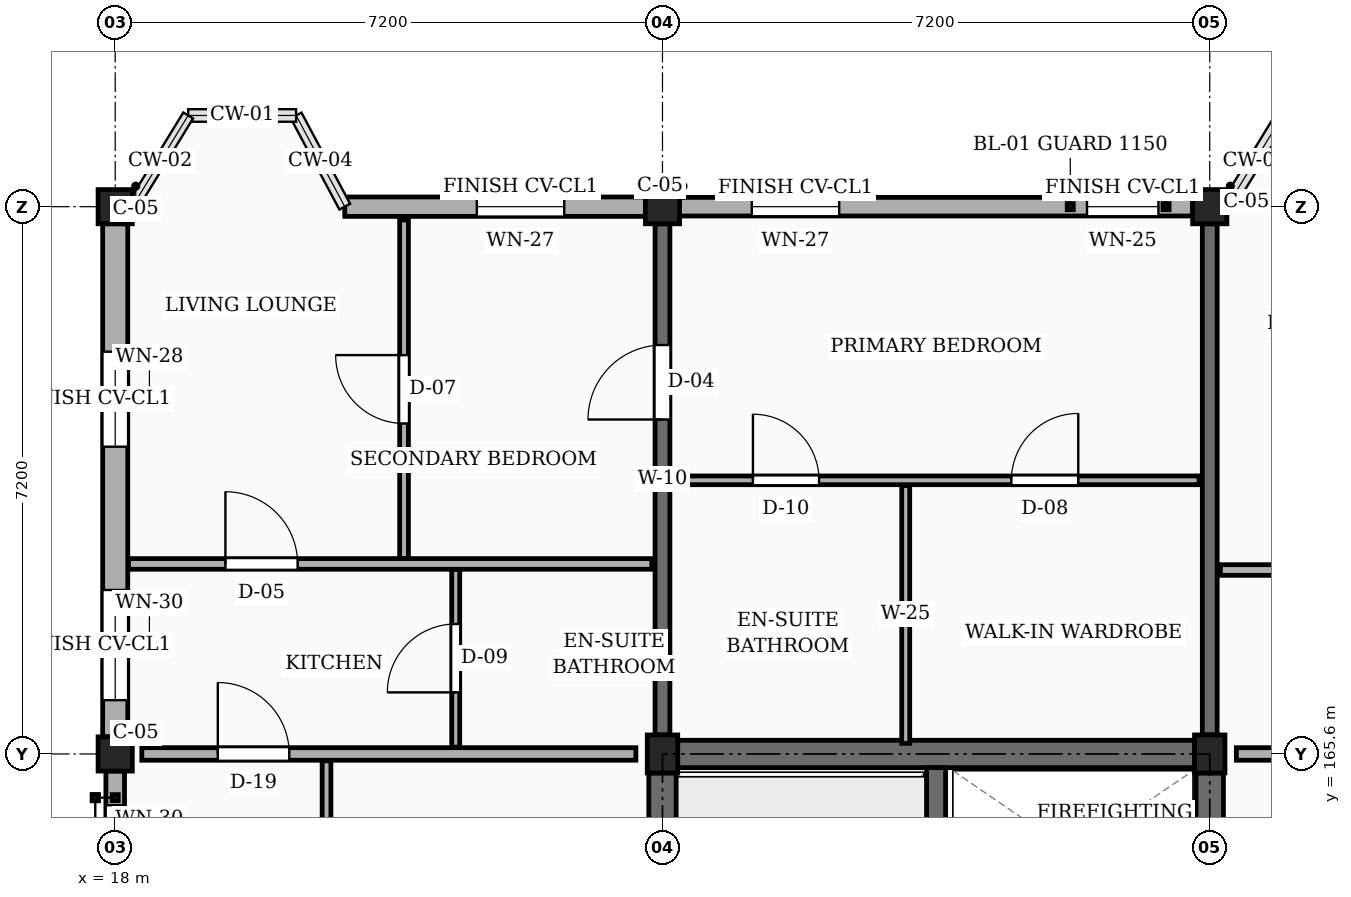
"""IFC4 building model, lengths in metres.
Left out: names, types, materials, properties, quantities, classifications, styles, units other than length and angle.
Written with IfcOpenShell. Run it as: python <this file> out.ifc"""

import sys

from ifc_helpers import new_model, si_unit, direction, frame, frame_2d, origin, origin_2d, place, context, subcontext, project, spatial, rectangle, extrude, element, fill, save


model = new_model("IFC4")
c1 = context("Model", 3, precision=1e-05, world=origin(), true_north=direction((0.0, 1.0)))
c2 = subcontext(c1, "Body", "Model", "MODEL_VIEW")
j1 = project(units=[si_unit("LENGTHUNIT", "METRE"), si_unit("PLANEANGLEUNIT", "RADIAN")], contexts=[c1])
p1 = place(None, origin())
s1 = spatial("IfcSite", under=j1, at=p1, CompositionType="ELEMENT")
p2 = place(p1, origin())
s2 = spatial("IfcBuilding", under=s1, at=p2, CompositionType="ELEMENT")
p3 = place(p2, frame((0.0, 0.0, 39.15)))
s3 = spatial("IfcBuildingStorey", under=s2, at=p3, CompositionType="ELEMENT", Elevation=39.15)
for number, where, z_axis, x_axis in (
    (1, (18.0, 165.6, 0.0), (0.0, 0.0, 1.0), (1.0, 0.0, 0.0)),
    (2, (18.0, 172.8, 0.0), (0.0, 0.0, 1.0), (1.0, 0.0, 0.0)),
):
    element("IfcColumn", number, at=place(p3, frame(where, z_axis=z_axis, x_axis=x_axis)), inside=s3, PredefinedType="COLUMN", context=c2, shape_type="SweptSolid", body=[
        extrude(rectangle(XDim=0.45, YDim=0.45, at=origin_2d()), origin(), (0.0, 0.0, 1.0), 3.15),
    ])
p4 = place(p3, frame((25.2, 165.6, 0.0), z_axis=(0.0, 0.0, 1.0), x_axis=(1.0, 0.0, 0.0)))
e3 = element("IfcColumn", 3, at=p4, inside=s3, PredefinedType="COLUMN", context=c2, shape_type="SweptSolid", body=[
    extrude(rectangle(XDim=0.4, YDim=0.5, at=origin_2d()), origin(), (0.0, 0.0, 1.0), 3.15),
])
p5 = place(p3, frame((25.2, 172.8, 0.0), z_axis=(0.0, 0.0, 1.0), x_axis=(1.0, 0.0, 0.0)))
e4 = element("IfcColumn", 4, at=p5, inside=s3, PredefinedType="COLUMN", context=c2, shape_type="SweptSolid", body=[
    extrude(rectangle(XDim=0.45, YDim=0.45, at=origin_2d()), origin(), (0.0, 0.0, 1.0), 3.15),
])
p6 = place(p3, frame((32.4, 165.6, 0.0), z_axis=(0.0, 0.0, 1.0), x_axis=(1.0, 0.0, 0.0)))
e5 = element("IfcColumn", 5, at=p6, inside=s3, PredefinedType="COLUMN", context=c2, shape_type="SweptSolid", body=[
    extrude(rectangle(XDim=0.4, YDim=0.5, at=origin_2d()), origin(), (0.0, 0.0, 1.0), 3.15),
])
p7 = place(p3, frame((32.4, 172.8, 0.0), z_axis=(0.0, 0.0, 1.0), x_axis=(1.0, 0.0, 0.0)))
e6 = element("IfcColumn", 6, at=p7, inside=s3, PredefinedType="COLUMN", context=c2, shape_type="SweptSolid", body=[
    extrude(rectangle(XDim=0.45, YDim=0.45, at=origin_2d()), origin(), (0.0, 0.0, 1.0), 3.15),
])
p8 = place(p3, frame((25.2, 165.85, 0.0), z_axis=(0.0, 0.0, 1.0), x_axis=(0.0, 1.0, 0.0)))
e7 = element("IfcWall", 7, at=p8, inside=s3, PredefinedType="SOLIDWALL", context=c2, shape_type="SweptSolid", body=[
    extrude(rectangle(XDim=6.725, YDim=0.195, at=frame_2d((3.362, 0.0))), origin(), (0.0, 0.0, 1.0), 2.185),
])
p9 = place(p8, frame((4.15, 0.0, 0.0)))
e8 = element("IfcOpeningElement", 8, at=p9, cuts=e7, PredefinedType="OPENING", context=c2, shape_type="SweptSolid", body=[
    extrude(rectangle(XDim=0.98, YDim=2.12, at=frame_2d((0.49, 1.06))), frame((0.0, 0.107, 0.0), z_axis=(0.0, -1.0, 0.0), x_axis=(1.0, 0.0, 0.0)), (0.0, 0.0, 1.0), 0.215),
])
p10 = place(p3, frame((32.4, 165.85, 0.0), z_axis=(0.0, 0.0, 1.0), x_axis=(0.0, 1.0, 0.0)))
e9 = element("IfcWall", 9, at=p10, inside=s3, PredefinedType="SOLIDWALL", context=c2, shape_type="SweptSolid", body=[
    extrude(rectangle(XDim=6.725, YDim=0.195, at=frame_2d((3.362, 0.0))), origin(), (0.0, 0.0, 1.0), 2.185),
])
p11 = place(p3, frame((32.175, 172.8, 0.0), z_axis=(0.0, 0.0, 1.0), x_axis=(-1.0, 0.0, 0.0)))
e10 = element("IfcWall", 10, at=p11, inside=s3, PredefinedType="SOLIDWALL", context=c2, shape_type="SweptSolid", body=[
    extrude(rectangle(XDim=6.75, YDim=0.245, at=frame_2d((3.375, 0.0))), origin(), (0.0, 0.0, 1.0), 2.455),
])
p12 = place(p11, frame((0.45, 0.0, 0.78)))
e11 = element("IfcOpeningElement", 11, at=p12, cuts=e10, PredefinedType="OPENING", context=c2, shape_type="SweptSolid", body=[
    extrude(rectangle(XDim=0.94, YDim=1.44, at=frame_2d((0.47, 0.72))), frame((0.0, 0.133, 0.0), z_axis=(0.0, -1.0, 0.0), x_axis=(1.0, 0.0, 0.0)), (0.0, 0.0, 1.0), 0.265),
])
p13 = place(p11, frame((4.65, 0.0, 0.78)))
e12 = element("IfcOpeningElement", 12, at=p13, cuts=e10, PredefinedType="OPENING", context=c2, shape_type="SweptSolid", body=[
    extrude(rectangle(XDim=1.15, YDim=1.44, at=frame_2d((0.575, 0.72))), frame((0.0, 0.133, 0.0), z_axis=(0.0, -1.0, 0.0), x_axis=(1.0, 0.0, 0.0)), (0.0, 0.0, 1.0), 0.265),
])
p14 = place(p3, frame((24.975, 172.8, 0.0), z_axis=(0.0, 0.0, 1.0), x_axis=(-1.0, 0.0, 0.0)))
e13 = element("IfcWall", 13, at=p14, inside=s3, PredefinedType="SOLIDWALL", context=c2, shape_type="SweptSolid", body=[
    extrude(rectangle(XDim=3.955, YDim=0.255, at=frame_2d((1.978, 0.0))), origin(), (0.0, 0.0, 1.0), 2.455),
])
p15 = place(p14, frame((1.067, 0.0, 0.78)))
e14 = element("IfcOpeningElement", 14, at=p15, cuts=e13, PredefinedType="OPENING", context=c2, shape_type="SweptSolid", body=[
    extrude(rectangle(XDim=1.15, YDim=1.44, at=frame_2d((0.575, 0.72))), frame((0.0, 0.137, 0.0), z_axis=(0.0, -1.0, 0.0), x_axis=(1.0, 0.0, 0.0)), (0.0, 0.0, 1.0), 0.275),
])
p16 = place(p3, frame((18.0, 172.575, 0.0), z_axis=(0.0, 0.0, 1.0), x_axis=(0.0, -1.0, 0.0)))
e15 = element("IfcWall", 15, at=p16, inside=s3, PredefinedType="SOLIDWALL", context=c2, shape_type="SweptSolid", body=[
    extrude(rectangle(XDim=6.75, YDim=0.33, at=frame_2d((3.375, 0.0))), origin(), (0.0, 0.0, 1.0), 2.455),
])
p17 = place(p16, frame((1.683, 0.0, 0.78)))
e16 = element("IfcOpeningElement", 16, at=p17, cuts=e15, PredefinedType="OPENING", context=c2, shape_type="SweptSolid", body=[
    extrude(rectangle(XDim=1.25, YDim=1.44, at=frame_2d((0.625, 0.72))), frame((0.0, 0.175, 0.0), z_axis=(0.0, -1.0, 0.0), x_axis=(1.0, 0.0, 0.0)), (0.0, 0.0, 1.0), 0.35),
])
p18 = place(p16, frame((4.817, 0.0, 0.78)))
e17 = element("IfcOpeningElement", 17, at=p18, cuts=e15, PredefinedType="OPENING", context=c2, shape_type="SweptSolid", body=[
    extrude(rectangle(XDim=1.45, YDim=1.44, at=frame_2d((0.725, 0.72))), frame((0.0, 0.175, 0.0), z_axis=(0.0, -1.0, 0.0), x_axis=(1.0, 0.0, 0.0)), (0.0, 0.0, 1.0), 0.35),
])
p19 = place(p3, frame((18.0, 165.375, 0.0), z_axis=(0.0, 0.0, 1.0), x_axis=(0.0, -1.0, 0.0)))
e18 = element("IfcWall", 18, at=p19, inside=s3, PredefinedType="SOLIDWALL", context=c2, shape_type="SweptSolid", body=[
    extrude(rectangle(XDim=6.75, YDim=0.245, at=frame_2d((3.375, 0.0))), origin(), (0.0, 0.0, 1.0), 2.455),
])
p20 = place(p19, frame((0.45, 0.0, 0.78)))
e19 = element("IfcOpeningElement", 19, at=p20, cuts=e18, PredefinedType="OPENING", context=c2, shape_type="SweptSolid", body=[
    extrude(rectangle(XDim=1.45, YDim=1.44, at=frame_2d((0.725, 0.72))), frame((0.0, 0.133, 0.0), z_axis=(0.0, -1.0, 0.0), x_axis=(1.0, 0.0, 0.0)), (0.0, 0.0, 1.0), 0.265),
])
p21 = place(p19, frame((4.65, 0.0, 0.78)))
e20 = element("IfcOpeningElement", 20, at=p21, cuts=e18, PredefinedType="OPENING", context=c2, shape_type="SweptSolid", body=[
    extrude(rectangle(XDim=0.92, YDim=1.15, at=frame_2d((0.46, 0.575))), frame((0.0, 0.133, 0.0), z_axis=(0.0, -1.0, 0.0), x_axis=(1.0, 0.0, 0.0)), (0.0, 0.0, 1.0), 0.265),
])
p22 = place(p3, frame((25.2, 158.65, 0.0), z_axis=(0.0, 0.0, 1.0), x_axis=(0.0, 1.0, 0.0)))
e21 = element("IfcWall", 21, at=p22, inside=s3, PredefinedType="SHEAR", context=c2, shape_type="SweptSolid", body=[
    extrude(rectangle(XDim=6.7, YDim=0.36, at=frame_2d((3.35, 0.0))), origin(), (0.0, 0.0, 1.0), 2.885),
])
p23 = place(p3, frame((25.4, 165.6, 0.0), z_axis=(0.0, 0.0, 1.0), x_axis=(1.0, 0.0, 0.0)))
e22 = element("IfcWall", 22, at=p23, inside=s3, PredefinedType="SHEAR", context=c2, shape_type="SweptSolid", body=[
    extrude(rectangle(XDim=6.8, YDim=0.36, at=frame_2d((3.4, 0.0))), origin(), (0.0, 0.0, 1.0), 2.885),
])
p24 = place(p3, frame((32.4, 158.65, 0.0), z_axis=(0.0, 0.0, 1.0), x_axis=(0.0, 1.0, 0.0)))
e23 = element("IfcWall", 23, at=p24, inside=s3, PredefinedType="SHEAR", context=c2, shape_type="SweptSolid", body=[
    extrude(rectangle(XDim=6.7, YDim=0.36, at=frame_2d((3.35, 0.0))), origin(), (0.0, 0.0, 1.0), 2.885),
])
p25 = place(p3, frame((28.8, 158.58, 0.0), z_axis=(0.0, 0.0, 1.0), x_axis=(0.0, 1.0, 0.0)))
e24 = element("IfcWall", 24, at=p25, inside=s3, PredefinedType="SHEAR", context=c2, shape_type="SweptSolid", body=[
    extrude(rectangle(XDim=6.84, YDim=0.25, at=frame_2d((3.42, 0.0))), origin(), (0.0, 0.0, 1.0), 2.885),
])
p26 = place(p25, frame((0.42, 0.0, 0.0)))
e25 = element("IfcOpeningElement", 25, at=p26, cuts=e24, PredefinedType="OPENING", context=c2, shape_type="SweptSolid", body=[
    extrude(rectangle(XDim=1.05, YDim=2.15, at=frame_2d((0.525, 1.075))), frame((0.0, 0.135, 0.0), z_axis=(0.0, -1.0, 0.0), x_axis=(1.0, 0.0, 0.0)), (0.0, 0.0, 1.0), 0.27),
])
p27 = place(p3, frame((18.35, 165.6, 0.0), z_axis=(0.0, 0.0, 1.0), x_axis=(1.0, 0.0, 0.0)))
e26 = element("IfcWall", 26, at=p27, inside=s3, PredefinedType="PARTITIONING", context=c2, shape_type="SweptSolid", body=[
    extrude(rectangle(XDim=6.5, YDim=0.165, at=frame_2d((3.25, 0.0))), origin(), (0.0, 0.0, 1.0), 2.32),
])
p28 = place(p27, frame((1.0, 0.0, 0.0)))
e27 = element("IfcOpeningElement", 27, at=p28, cuts=e26, PredefinedType="OPENING", context=c2, shape_type="SweptSolid", body=[
    extrude(rectangle(XDim=0.94, YDim=2.12, at=frame_2d((0.47, 1.06))), frame((0.0, 0.093, 0.0), z_axis=(0.0, -1.0, 0.0), x_axis=(1.0, 0.0, 0.0)), (0.0, 0.0, 1.0), 0.185),
])
p29 = place(p3, frame((32.75, 165.6, 0.0), z_axis=(0.0, 0.0, 1.0), x_axis=(1.0, 0.0, 0.0)))
e28 = element("IfcWall", 28, at=p29, inside=s3, PredefinedType="PARTITIONING", context=c2, shape_type="SweptSolid", body=[
    extrude(rectangle(XDim=6.5, YDim=0.165, at=frame_2d((3.25, 0.0))), origin(), (0.0, 0.0, 1.0), 2.32),
])
p30 = place(p29, frame((1.0, 0.0, 0.0)))
e29 = element("IfcOpeningElement", 29, at=p30, cuts=e28, PredefinedType="OPENING", context=c2, shape_type="SweptSolid", body=[
    extrude(rectangle(XDim=1.14, YDim=2.18, at=frame_2d((0.57, 1.09))), frame((0.0, 0.093, 0.0), z_axis=(0.0, -1.0, 0.0), x_axis=(1.0, 0.0, 0.0)), (0.0, 0.0, 1.0), 0.185),
])
p31 = place(p3, frame((20.78, 158.49, 0.0), z_axis=(0.0, 0.0, 1.0), x_axis=(0.0, 1.0, 0.0)))
e30 = element("IfcWall", 30, at=p31, inside=s3, PredefinedType="PARTITIONING", context=c2, shape_type="SweptSolid", body=[
    extrude(rectangle(XDim=7.02, YDim=0.115, at=frame_2d((3.51, 0.0))), origin(), (0.0, 0.0, 1.0), 2.32),
])
p32 = place(p31, frame((2.85, 0.0, 0.0)))
e31 = element("IfcOpeningElement", 31, at=p32, cuts=e30, PredefinedType="OPENING", context=c2, shape_type="SweptSolid", body=[
    extrude(rectangle(XDim=1.02, YDim=2.15, at=frame_2d((0.51, 1.075))), frame((0.0, 0.067, 0.0), z_axis=(0.0, -1.0, 0.0), x_axis=(1.0, 0.0, 0.0)), (0.0, 0.0, 1.0), 0.135),
])
p33 = place(p3, frame((21.8, 168.17, 0.0), z_axis=(0.0, 0.0, 1.0), x_axis=(0.0, 1.0, 0.0)))
e32 = element("IfcWall", 32, at=p33, inside=s3, PredefinedType="PARTITIONING", context=c2, shape_type="SweptSolid", body=[
    extrude(rectangle(XDim=4.455, YDim=0.115, at=frame_2d((2.228, 0.0))), origin(), (0.0, 0.0, 1.0), 2.32),
])
p34 = place(p33, frame((1.778, 0.0, 0.0)))
e33 = element("IfcOpeningElement", 33, at=p34, cuts=e32, PredefinedType="OPENING", context=c2, shape_type="SweptSolid", body=[
    extrude(rectangle(XDim=0.9, YDim=2.1, at=frame_2d((0.45, 1.05))), frame((0.0, 0.067, 0.0), z_axis=(0.0, -1.0, 0.0), x_axis=(1.0, 0.0, 0.0)), (0.0, 0.0, 1.0), 0.135),
])
p35 = place(p3, frame((22.48, 165.69, 0.0), z_axis=(0.0, 0.0, 1.0), x_axis=(0.0, 1.0, 0.0)))
e34 = element("IfcWall", 34, at=p35, inside=s3, PredefinedType="PARTITIONING", context=c2, shape_type="SweptSolid", body=[
    extrude(rectangle(XDim=2.34, YDim=0.105, at=frame_2d((1.17, 0.0))), origin(), (0.0, 0.0, 1.0), 2.32),
])
p36 = place(p35, frame((0.72, 0.0, 0.0)))
e35 = element("IfcOpeningElement", 35, at=p36, cuts=e34, PredefinedType="OPENING", context=c2, shape_type="SweptSolid", body=[
    extrude(rectangle(XDim=0.9, YDim=2.05, at=frame_2d((0.45, 1.025))), frame((0.0, 0.062, 0.0), z_axis=(0.0, -1.0, 0.0), x_axis=(1.0, 0.0, 0.0)), (0.0, 0.0, 1.0), 0.125),
])
p37 = place(p3, frame((18.175, 168.1, 0.0), z_axis=(0.0, 0.0, 1.0), x_axis=(1.0, 0.0, 0.0)))
e36 = element("IfcWall", 36, at=p37, inside=s3, PredefinedType="PARTITIONING", context=c2, shape_type="SweptSolid", body=[
    extrude(rectangle(XDim=6.885, YDim=0.14, at=frame_2d((3.442, 0.0))), origin(), (0.0, 0.0, 1.0), 2.32),
])
p38 = place(p37, frame((1.275, 0.0, 0.0)))
e37 = element("IfcOpeningElement", 37, at=p38, cuts=e36, PredefinedType="OPENING", context=c2, shape_type="SweptSolid", body=[
    extrude(rectangle(XDim=0.95, YDim=2.1, at=frame_2d((0.475, 1.05))), frame((0.0, 0.08, 0.0), z_axis=(0.0, -1.0, 0.0), x_axis=(1.0, 0.0, 0.0)), (0.0, 0.0, 1.0), 0.16),
])
p39 = place(p3, frame((25.34, 169.2, 0.0), z_axis=(0.0, 0.0, 1.0), x_axis=(1.0, 0.0, 0.0)))
e38 = element("IfcWall", 38, at=p39, inside=s3, PredefinedType="PARTITIONING", context=c2, shape_type="SweptSolid", body=[
    extrude(rectangle(XDim=6.92, YDim=0.115, at=frame_2d((3.46, 0.0))), origin(), (0.0, 0.0, 1.0), 2.32),
])
p40 = place(p39, frame((1.05, 0.0, 0.0)))
e39 = element("IfcOpeningElement", 39, at=p40, cuts=e38, PredefinedType="OPENING", context=c2, shape_type="SweptSolid", body=[
    extrude(rectangle(XDim=0.87, YDim=2.05, at=frame_2d((0.435, 1.025))), frame((0.0, 0.067, 0.0), z_axis=(0.0, -1.0, 0.0), x_axis=(1.0, 0.0, 0.0)), (0.0, 0.0, 1.0), 0.135),
])
p41 = place(p39, frame((4.45, 0.0, 0.0)))
e40 = element("IfcOpeningElement", 40, at=p41, cuts=e38, PredefinedType="OPENING", context=c2, shape_type="SweptSolid", body=[
    extrude(rectangle(XDim=0.88, YDim=2.08, at=frame_2d((0.44, 1.04))), frame((0.0, 0.067, 0.0), z_axis=(0.0, -1.0, 0.0), x_axis=(1.0, 0.0, 0.0)), (0.0, 0.0, 1.0), 0.135),
])
p42 = place(p3, frame((28.4, 165.74, 0.0), z_axis=(0.0, 0.0, 1.0), x_axis=(0.0, 1.0, 0.0)))
e41 = element("IfcWall", 41, at=p42, inside=s3, PredefinedType="PARTITIONING", context=c2, shape_type="SweptSolid", body=[
    extrude(rectangle(XDim=3.39, YDim=0.105, at=frame_2d((1.695, 0.0))), origin(), (0.0, 0.0, 1.0), 2.32),
])
p43 = place(p3, frame((32.54, 168.02, 0.0), z_axis=(0.0, 0.0, 1.0), x_axis=(1.0, 0.0, 0.0)))
e42 = element("IfcWall", 42, at=p43, inside=s3, PredefinedType="PARTITIONING", context=c2, shape_type="SweptSolid", body=[
    extrude(rectangle(XDim=6.92, YDim=0.14, at=frame_2d((3.46, 0.0))), origin(), (0.0, 0.0, 1.0), 2.32),
])
p44 = place(p43, frame((1.31, 0.0, 0.0)))
e43 = element("IfcOpeningElement", 43, at=p44, cuts=e42, PredefinedType="OPENING", context=c2, shape_type="SweptSolid", body=[
    extrude(rectangle(XDim=0.92, YDim=2.1, at=frame_2d((0.46, 1.05))), frame((0.0, 0.08, 0.0), z_axis=(0.0, -1.0, 0.0), x_axis=(1.0, 0.0, 0.0)), (0.0, 0.0, 1.0), 0.16),
])
p45 = place(p12, origin())
e44 = element("IfcWindow", 44, at=p45, inside=s3, PartitioningType="SINGLE_PANEL", PredefinedType="WINDOW", context=c2, shape_type="SweptSolid", body=[
    extrude(rectangle(XDim=0.94, YDim=1.44, at=frame_2d((0.47, 0.72))), frame((0.0, 0.03, 0.0), z_axis=(0.0, -1.0, 0.0), x_axis=(1.0, 0.0, 0.0)), (0.0, 0.0, 1.0), 0.06),
])
fill(e11, e44)
p46 = place(p13, origin())
e45 = element("IfcWindow", 45, at=p46, inside=s3, PartitioningType="SINGLE_PANEL", PredefinedType="WINDOW", context=c2, shape_type="SweptSolid", body=[
    extrude(rectangle(XDim=1.15, YDim=1.44, at=frame_2d((0.575, 0.72))), frame((0.0, 0.03, 0.0), z_axis=(0.0, -1.0, 0.0), x_axis=(1.0, 0.0, 0.0)), (0.0, 0.0, 1.0), 0.06),
])
fill(e12, e45)
p47 = place(p15, origin())
e46 = element("IfcWindow", 46, at=p47, inside=s3, PartitioningType="SINGLE_PANEL", PredefinedType="WINDOW", context=c2, shape_type="SweptSolid", body=[
    extrude(rectangle(XDim=1.15, YDim=1.44, at=frame_2d((0.575, 0.72))), frame((0.0, 0.03, 0.0), z_axis=(0.0, -1.0, 0.0), x_axis=(1.0, 0.0, 0.0)), (0.0, 0.0, 1.0), 0.06),
])
fill(e14, e46)
p48 = place(p17, origin())
e47 = element("IfcWindow", 47, at=p48, inside=s3, PartitioningType="SINGLE_PANEL", PredefinedType="WINDOW", context=c2, shape_type="SweptSolid", body=[
    extrude(rectangle(XDim=1.25, YDim=1.44, at=frame_2d((0.625, 0.72))), frame((0.0, 0.03, 0.0), z_axis=(0.0, -1.0, 0.0), x_axis=(1.0, 0.0, 0.0)), (0.0, 0.0, 1.0), 0.06),
])
fill(e16, e47)
p49 = place(p18, origin())
e48 = element("IfcWindow", 48, at=p49, inside=s3, PartitioningType="SINGLE_PANEL", PredefinedType="WINDOW", context=c2, shape_type="SweptSolid", body=[
    extrude(rectangle(XDim=1.45, YDim=1.44, at=frame_2d((0.725, 0.72))), frame((0.0, 0.03, 0.0), z_axis=(0.0, -1.0, 0.0), x_axis=(1.0, 0.0, 0.0)), (0.0, 0.0, 1.0), 0.06),
])
fill(e17, e48)
p50 = place(p20, origin())
e49 = element("IfcWindow", 49, at=p50, inside=s3, PartitioningType="SINGLE_PANEL", PredefinedType="WINDOW", context=c2, shape_type="SweptSolid", body=[
    extrude(rectangle(XDim=1.45, YDim=1.44, at=frame_2d((0.725, 0.72))), frame((0.0, 0.03, 0.0), z_axis=(0.0, -1.0, 0.0), x_axis=(1.0, 0.0, 0.0)), (0.0, 0.0, 1.0), 0.06),
])
fill(e19, e49)
p51 = place(p28, origin())
e50 = element("IfcDoor", 50, at=p51, inside=s3, OperationType="SINGLE_SWING_LEFT", PredefinedType="DOOR", context=c2, shape_type="SweptSolid", body=[
    extrude(rectangle(XDim=0.94, YDim=2.12, at=frame_2d((0.47, 1.06))), frame((0.0, 0.025, 0.0), z_axis=(0.0, -1.0, 0.0), x_axis=(1.0, 0.0, 0.0)), (0.0, 0.0, 1.0), 0.05),
])
fill(e27, e50)
p52 = place(p34, origin())
e51 = element("IfcDoor", 51, at=p52, inside=s3, OperationType="SINGLE_SWING_RIGHT", PredefinedType="DOOR", context=c2, shape_type="SweptSolid", body=[
    extrude(rectangle(XDim=0.9, YDim=2.1, at=frame_2d((0.45, 1.05))), frame((0.0, 0.025, 0.0), z_axis=(0.0, -1.0, 0.0), x_axis=(1.0, 0.0, 0.0)), (0.0, 0.0, 1.0), 0.05),
])
fill(e33, e51)
p53 = place(p36, origin())
e52 = element("IfcDoor", 52, at=p53, inside=s3, OperationType="SINGLE_SWING_LEFT", PredefinedType="DOOR", context=c2, shape_type="SweptSolid", body=[
    extrude(rectangle(XDim=0.9, YDim=2.05, at=frame_2d((0.45, 1.025))), frame((0.0, 0.025, 0.0), z_axis=(0.0, -1.0, 0.0), x_axis=(1.0, 0.0, 0.0)), (0.0, 0.0, 1.0), 0.05),
])
fill(e35, e52)
p54 = place(p38, origin())
e53 = element("IfcDoor", 53, at=p54, inside=s3, OperationType="SINGLE_SWING_LEFT", PredefinedType="DOOR", context=c2, shape_type="SweptSolid", body=[
    extrude(rectangle(XDim=0.95, YDim=2.1, at=frame_2d((0.475, 1.05))), frame((0.0, 0.025, 0.0), z_axis=(0.0, -1.0, 0.0), x_axis=(1.0, 0.0, 0.0)), (0.0, 0.0, 1.0), 0.05),
])
fill(e37, e53)
p55 = place(p40, origin())
e54 = element("IfcDoor", 54, at=p55, inside=s3, OperationType="SINGLE_SWING_LEFT", PredefinedType="DOOR", context=c2, shape_type="SweptSolid", body=[
    extrude(rectangle(XDim=0.87, YDim=2.05, at=frame_2d((0.435, 1.025))), frame((0.0, 0.025, 0.0), z_axis=(0.0, -1.0, 0.0), x_axis=(1.0, 0.0, 0.0)), (0.0, 0.0, 1.0), 0.05),
])
fill(e39, e54)
p56 = place(p41, origin())
e55 = element("IfcDoor", 55, at=p56, inside=s3, OperationType="SINGLE_SWING_RIGHT", PredefinedType="DOOR", context=c2, shape_type="SweptSolid", body=[
    extrude(rectangle(XDim=0.88, YDim=2.08, at=frame_2d((0.44, 1.04))), frame((0.0, 0.025, 0.0), z_axis=(0.0, -1.0, 0.0), x_axis=(1.0, 0.0, 0.0)), (0.0, 0.0, 1.0), 0.05),
])
fill(e40, e55)
p57 = place(p9, origin())
e56 = element("IfcDoor", 56, at=p57, inside=s3, OperationType="SINGLE_SWING_LEFT", PredefinedType="DOOR", context=c2, shape_type="SweptSolid", body=[
    extrude(rectangle(XDim=0.98, YDim=2.12, at=frame_2d((0.49, 1.06))), frame((0.0, 0.025, 0.0), z_axis=(0.0, -1.0, 0.0), x_axis=(1.0, 0.0, 0.0)), (0.0, 0.0, 1.0), 0.05),
])
fill(e8, e56)
save(model, sys.argv[1])
